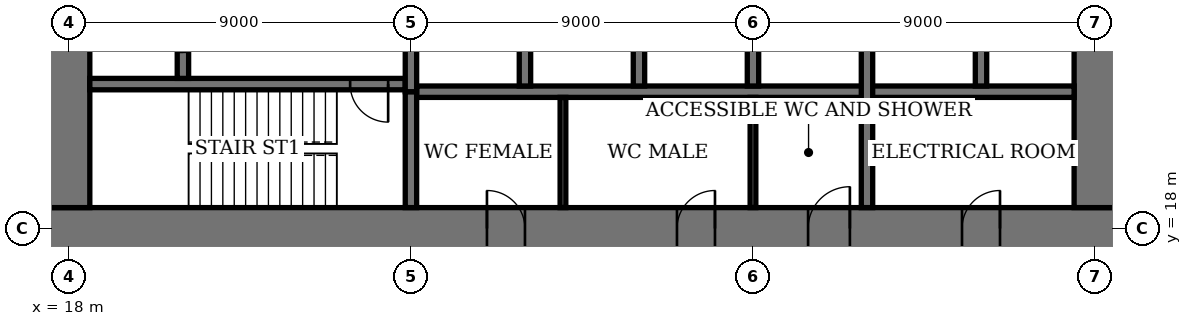
"""IFC4 building model, lengths in metres.
Left out: names, types, materials, properties, quantities, classifications, styles, units other than length and angle.
Written with IfcOpenShell. Run it as: python <this file> out.ifc"""

import sys

from ifc_helpers import new_model, si_unit, direction, frame, frame_2d, origin, place, context, subcontext, project, spatial, rectangle, extrude, element, fill, save


model = new_model("IFC4")
c1 = context("Model", 3, precision=1e-05, world=origin(), true_north=direction((0.0, 1.0)))
c2 = subcontext(c1, "Body", "Model", "MODEL_VIEW")
j1 = project(units=[si_unit("LENGTHUNIT", "METRE"), si_unit("PLANEANGLEUNIT", "RADIAN")], contexts=[c1])
p1 = place(None, origin())
s1 = spatial("IfcSite", under=j1, at=p1, CompositionType="ELEMENT")
p2 = place(p1, origin())
s2 = spatial("IfcBuilding", under=s1, at=p2, CompositionType="ELEMENT")
p3 = place(p2, frame((0.0, 0.0, 162.2)))
s3 = spatial("IfcBuildingStorey", under=s2, at=p3, CompositionType="ELEMENT", Elevation=162.2)
p4 = place(p3, frame((17.45, 18.0, 0.0), z_axis=(0.0, 0.0, 1.0), x_axis=(1.0, 0.0, 0.0)))
e1 = element("IfcWall", 1, at=p4, inside=s3, PredefinedType="SHEAR", context=c2, shape_type="SweptSolid", body=[
    extrude(rectangle(XDim=28.1, YDim=1.1, at=frame_2d((14.05, 0.0))), origin(), (0.0, 0.0, 1.0), 4.0),
])
p5 = place(p4, frame((11.55, 0.0, 0.0)))
e2 = element("IfcOpeningElement", 2, at=p5, cuts=e1, PredefinedType="OPENING", context=c2, shape_type="SweptSolid", body=[
    extrude(rectangle(XDim=1.0, YDim=2.4, at=frame_2d((0.5, 1.2))), frame((0.0, 0.56, 0.0), z_axis=(0.0, -1.0, 0.0), x_axis=(1.0, 0.0, 0.0)), (0.0, 0.0, 1.0), 1.12),
])
p6 = place(p4, frame((16.55, 0.0, 0.0)))
e3 = element("IfcOpeningElement", 3, at=p6, cuts=e1, PredefinedType="OPENING", context=c2, shape_type="SweptSolid", body=[
    extrude(rectangle(XDim=1.0, YDim=2.4, at=frame_2d((0.5, 1.2))), frame((0.0, 0.56, 0.0), z_axis=(0.0, -1.0, 0.0), x_axis=(1.0, 0.0, 0.0)), (0.0, 0.0, 1.0), 1.12),
])
p7 = place(p4, frame((20.0, 0.0, 0.0)))
e4 = element("IfcOpeningElement", 4, at=p7, cuts=e1, PredefinedType="OPENING", context=c2, shape_type="SweptSolid", body=[
    extrude(rectangle(XDim=1.1, YDim=2.4, at=frame_2d((0.55, 1.2))), frame((0.0, 0.56, 0.0), z_axis=(0.0, -1.0, 0.0), x_axis=(1.0, 0.0, 0.0)), (0.0, 0.0, 1.0), 1.12),
])
p8 = place(p4, frame((24.05, 0.0, 0.0)))
e5 = element("IfcOpeningElement", 5, at=p8, cuts=e1, PredefinedType="OPENING", context=c2, shape_type="SweptSolid", body=[
    extrude(rectangle(XDim=1.0, YDim=2.4, at=frame_2d((0.5, 1.2))), frame((0.0, 0.56, 0.0), z_axis=(0.0, -1.0, 0.0), x_axis=(1.0, 0.0, 0.0)), (0.0, 0.0, 1.0), 1.12),
])
p9 = place(p3, frame((18.0, 35.45, 0.0), z_axis=(0.0, 0.0, 1.0), x_axis=(0.0, -1.0, 0.0)))
e6 = element("IfcWall", 6, at=p9, inside=s3, PredefinedType="SHEAR", context=c2, shape_type="SweptSolid", body=[
    extrude(rectangle(XDim=16.9, YDim=1.1, at=frame_2d((8.45, 0.0))), origin(), (0.0, 0.0, 1.0), 4.0),
])
p10 = place(p9, frame((8.9, 0.0, 0.0)))
e7 = element("IfcOpeningElement", 7, at=p10, cuts=e6, PredefinedType="OPENING", context=c2, shape_type="SweptSolid", body=[
    extrude(rectangle(XDim=1.8, YDim=2.4, at=frame_2d((0.9, 1.2))), frame((0.0, 0.56, 0.0), z_axis=(0.0, -1.0, 0.0), x_axis=(1.0, 0.0, 0.0)), (0.0, 0.0, 1.0), 1.12),
])
p11 = place(p3, frame((45.0, 18.55, 0.0), z_axis=(0.0, 0.0, 1.0), x_axis=(0.0, 1.0, 0.0)))
e8 = element("IfcWall", 8, at=p11, inside=s3, PredefinedType="SHEAR", context=c2, shape_type="SweptSolid", body=[
    extrude(rectangle(XDim=16.9, YDim=1.1, at=frame_2d((8.45, 0.0))), origin(), (0.0, 0.0, 1.0), 4.0),
])
p12 = place(p11, frame((8.9, 0.0, 0.0)))
e9 = element("IfcOpeningElement", 9, at=p12, cuts=e8, PredefinedType="OPENING", context=c2, shape_type="SweptSolid", body=[
    extrude(rectangle(XDim=1.8, YDim=2.4, at=frame_2d((0.9, 1.2))), frame((0.0, 0.56, 0.0), z_axis=(0.0, -1.0, 0.0), x_axis=(1.0, 0.0, 0.0)), (0.0, 0.0, 1.0), 1.12),
])
p13 = place(p3, frame((18.55, 21.8, 0.0), z_axis=(0.0, 0.0, 1.0), x_axis=(1.0, 0.0, 0.0)))
e10 = element("IfcWall", 10, at=p13, inside=s3, PredefinedType="SHEAR", context=c2, shape_type="SweptSolid", body=[
    extrude(rectangle(XDim=8.3, YDim=0.3, at=frame_2d((4.15, 0.0))), origin(), (0.0, 0.0, 1.0), 4.0),
])
p14 = place(p13, frame((6.85, 0.0, 0.0)))
e11 = element("IfcOpeningElement", 11, at=p14, cuts=e10, PredefinedType="OPENING", context=c2, shape_type="SweptSolid", body=[
    extrude(rectangle(XDim=1.0, YDim=2.4, at=frame_2d((0.5, 1.2))), frame((0.0, 0.16, 0.0), z_axis=(0.0, -1.0, 0.0), x_axis=(1.0, 0.0, 0.0)), (0.0, 0.0, 1.0), 0.32),
])
p15 = place(p3, frame((27.0, 18.55, 0.0), z_axis=(0.0, 0.0, 1.0), x_axis=(0.0, 1.0, 0.0)))
e12 = element("IfcWall", 12, at=p15, inside=s3, PredefinedType="SHEAR", context=c2, shape_type="SweptSolid", body=[
    extrude(rectangle(XDim=3.05, YDim=0.3, at=frame_2d((1.525, 0.0))), origin(), (0.0, 0.0, 1.0), 4.0),
])
p16 = place(p3, frame((21.0, 21.95, 0.0), z_axis=(0.0, 0.0, 1.0), x_axis=(0.0, 1.0, 0.0)))
e13 = element("IfcWall", 13, at=p16, inside=s3, PredefinedType="SHEAR", context=c2, shape_type="SweptSolid", body=[
    extrude(rectangle(XDim=2.5, YDim=0.3, at=frame_2d((1.25, 0.0))), origin(), (0.0, 0.0, 1.0), 4.0),
])
p17 = place(p16, frame((0.7, 0.0, 0.0)))
e14 = element("IfcOpeningElement", 14, at=p17, cuts=e13, PredefinedType="OPENING", context=c2, shape_type="SweptSolid", body=[
    extrude(rectangle(XDim=1.1, YDim=2.4, at=frame_2d((0.55, 1.2))), frame((0.0, 0.16, 0.0), z_axis=(0.0, -1.0, 0.0), x_axis=(1.0, 0.0, 0.0)), (0.0, 0.0, 1.0), 0.32),
])
p18 = place(p3, frame((27.15, 21.6, 0.0), z_axis=(0.0, 0.0, 1.0), x_axis=(1.0, 0.0, 0.0)))
e15 = element("IfcWall", 15, at=p18, inside=s3, PredefinedType="SHEAR", context=c2, shape_type="SweptSolid", body=[
    extrude(rectangle(XDim=17.3, YDim=0.3, at=frame_2d((8.65, 0.0))), origin(), (0.0, 0.0, 1.0), 4.0),
])
for number, where, z_axis, x_axis in (
    (16, (30.0, 21.75, 0.0), (0.0, 0.0, 1.0), (0.0, 1.0, 0.0)),
    (17, (33.0, 21.75, 0.0), (0.0, 0.0, 1.0), (0.0, 1.0, 0.0)),
    (18, (36.0, 21.75, 0.0), (0.0, 0.0, 1.0), (0.0, 1.0, 0.0)),
):
    element("IfcWall", number, at=place(p3, frame(where, z_axis=z_axis, x_axis=x_axis)), inside=s3, PredefinedType="SHEAR", context=c2, shape_type="SweptSolid", body=[
        extrude(rectangle(XDim=2.7, YDim=0.3, at=frame_2d((1.35, 0.0))), origin(), (0.0, 0.0, 1.0), 4.0),
    ])
p19 = place(p3, frame((39.0, 18.55, 0.0), z_axis=(0.0, 0.0, 1.0), x_axis=(0.0, 1.0, 0.0)))
e19 = element("IfcWall", 19, at=p19, inside=s3, PredefinedType="SHEAR", context=c2, shape_type="SweptSolid", body=[
    extrude(rectangle(XDim=5.9, YDim=0.3, at=frame_2d((2.95, 0.0))), origin(), (0.0, 0.0, 1.0), 4.0),
])
p20 = place(p3, frame((42.0, 21.75, 0.0), z_axis=(0.0, 0.0, 1.0), x_axis=(0.0, 1.0, 0.0)))
e20 = element("IfcWall", 20, at=p20, inside=s3, PredefinedType="SHEAR", context=c2, shape_type="SweptSolid", body=[
    extrude(rectangle(XDim=2.7, YDim=0.3, at=frame_2d((1.35, 0.0))), origin(), (0.0, 0.0, 1.0), 4.0),
])
p21 = place(p3, frame((27.0, 21.6, 0.0), z_axis=(0.0, 0.0, 1.0), x_axis=(0.0, 1.0, 0.0)))
e21 = element("IfcWall", 21, at=p21, inside=s3, PredefinedType="SHEAR", context=c2, shape_type="SweptSolid", body=[
    extrude(rectangle(XDim=2.85, YDim=0.3, at=frame_2d((1.425, 0.0))), origin(), (0.0, 0.0, 1.0), 4.0),
])
for number, where, z_axis, x_axis in (
    (22, (31.0, 18.55, 0.0), (0.0, 0.0, 1.0), (0.0, 1.0, 0.0)),
    (23, (36.0, 18.55, 0.0), (0.0, 0.0, 1.0), (0.0, 1.0, 0.0)),
):
    element("IfcWall", number, at=place(p3, frame(where, z_axis=z_axis, x_axis=x_axis)), inside=s3, PredefinedType="PARTITIONING", context=c2, shape_type="SweptSolid", body=[
        extrude(rectangle(XDim=2.9, YDim=0.15, at=frame_2d((1.45, 0.0))), origin(), (0.0, 0.0, 1.0), 3.75),
    ])
p22 = place(p5, origin())
e24 = element("IfcDoor", 24, at=p22, inside=s3, OperationType="SINGLE_SWING_RIGHT", PredefinedType="DOOR", context=c2, shape_type="SweptSolid", body=[
    extrude(rectangle(XDim=1.0, YDim=2.4, at=frame_2d((0.5, 1.2))), frame((0.0, 0.025, 0.0), z_axis=(0.0, -1.0, 0.0), x_axis=(1.0, 0.0, 0.0)), (0.0, 0.0, 1.0), 0.05),
    extrude(rectangle(XDim=0.04, YDim=2.4, at=frame_2d((0.02, 1.2))), frame((0.0, 0.4, 0.0), z_axis=(0.0, -1.0, 0.0), x_axis=(1.0, 0.0, 0.0)), (0.0, 0.0, 1.0), 0.8),
    extrude(rectangle(XDim=0.04, YDim=2.4, at=frame_2d((0.98, 1.2))), frame((0.0, 0.4, 0.0), z_axis=(0.0, -1.0, 0.0), x_axis=(1.0, 0.0, 0.0)), (0.0, 0.0, 1.0), 0.8),
    extrude(rectangle(XDim=1.0, YDim=0.04, at=frame_2d((0.5, 2.38))), frame((0.0, 0.4, 0.0), z_axis=(0.0, -1.0, 0.0), x_axis=(1.0, 0.0, 0.0)), (0.0, 0.0, 1.0), 0.8),
])
fill(e2, e24)
p23 = place(p6, origin())
e25 = element("IfcDoor", 25, at=p23, inside=s3, OperationType="SINGLE_SWING_LEFT", PredefinedType="DOOR", context=c2, shape_type="SweptSolid", body=[
    extrude(rectangle(XDim=1.0, YDim=2.4, at=frame_2d((0.5, 1.2))), frame((0.0, 0.025, 0.0), z_axis=(0.0, -1.0, 0.0), x_axis=(1.0, 0.0, 0.0)), (0.0, 0.0, 1.0), 0.05),
    extrude(rectangle(XDim=0.04, YDim=2.4, at=frame_2d((0.02, 1.2))), frame((0.0, 0.4, 0.0), z_axis=(0.0, -1.0, 0.0), x_axis=(1.0, 0.0, 0.0)), (0.0, 0.0, 1.0), 0.8),
    extrude(rectangle(XDim=0.04, YDim=2.4, at=frame_2d((0.98, 1.2))), frame((0.0, 0.4, 0.0), z_axis=(0.0, -1.0, 0.0), x_axis=(1.0, 0.0, 0.0)), (0.0, 0.0, 1.0), 0.8),
    extrude(rectangle(XDim=1.0, YDim=0.04, at=frame_2d((0.5, 2.38))), frame((0.0, 0.4, 0.0), z_axis=(0.0, -1.0, 0.0), x_axis=(1.0, 0.0, 0.0)), (0.0, 0.0, 1.0), 0.8),
])
fill(e3, e25)
p24 = place(p7, origin())
e26 = element("IfcDoor", 26, at=p24, inside=s3, OperationType="SINGLE_SWING_LEFT", PredefinedType="DOOR", context=c2, shape_type="SweptSolid", body=[
    extrude(rectangle(XDim=1.1, YDim=2.4, at=frame_2d((0.55, 1.2))), frame((0.0, 0.025, 0.0), z_axis=(0.0, -1.0, 0.0), x_axis=(1.0, 0.0, 0.0)), (0.0, 0.0, 1.0), 0.05),
    extrude(rectangle(XDim=0.04, YDim=2.4, at=frame_2d((0.02, 1.2))), frame((0.0, 0.44, 0.0), z_axis=(0.0, -1.0, 0.0), x_axis=(1.0, 0.0, 0.0)), (0.0, 0.0, 1.0), 0.88),
    extrude(rectangle(XDim=0.04, YDim=2.4, at=frame_2d((1.08, 1.2))), frame((0.0, 0.44, 0.0), z_axis=(0.0, -1.0, 0.0), x_axis=(1.0, 0.0, 0.0)), (0.0, 0.0, 1.0), 0.88),
    extrude(rectangle(XDim=1.1, YDim=0.04, at=frame_2d((0.55, 2.38))), frame((0.0, 0.44, 0.0), z_axis=(0.0, -1.0, 0.0), x_axis=(1.0, 0.0, 0.0)), (0.0, 0.0, 1.0), 0.88),
])
fill(e4, e26)
p25 = place(p8, origin())
e27 = element("IfcDoor", 27, at=p25, inside=s3, OperationType="SINGLE_SWING_LEFT", PredefinedType="DOOR", context=c2, shape_type="SweptSolid", body=[
    extrude(rectangle(XDim=1.0, YDim=2.4, at=frame_2d((0.5, 1.2))), frame((0.0, 0.025, 0.0), z_axis=(0.0, -1.0, 0.0), x_axis=(1.0, 0.0, 0.0)), (0.0, 0.0, 1.0), 0.05),
    extrude(rectangle(XDim=0.04, YDim=2.4, at=frame_2d((0.02, 1.2))), frame((0.0, 0.4, 0.0), z_axis=(0.0, -1.0, 0.0), x_axis=(1.0, 0.0, 0.0)), (0.0, 0.0, 1.0), 0.8),
    extrude(rectangle(XDim=0.04, YDim=2.4, at=frame_2d((0.98, 1.2))), frame((0.0, 0.4, 0.0), z_axis=(0.0, -1.0, 0.0), x_axis=(1.0, 0.0, 0.0)), (0.0, 0.0, 1.0), 0.8),
    extrude(rectangle(XDim=1.0, YDim=0.04, at=frame_2d((0.5, 2.38))), frame((0.0, 0.4, 0.0), z_axis=(0.0, -1.0, 0.0), x_axis=(1.0, 0.0, 0.0)), (0.0, 0.0, 1.0), 0.8),
])
fill(e5, e27)
p26 = place(p14, origin())
e28 = element("IfcDoor", 28, at=p26, inside=s3, OperationType="SINGLE_SWING_RIGHT", PredefinedType="DOOR", context=c2, shape_type="SweptSolid", body=[
    extrude(rectangle(XDim=1.0, YDim=2.4, at=frame_2d((0.5, 1.2))), frame((0.0, 0.03, 0.0), z_axis=(0.0, -1.0, 0.0), x_axis=(1.0, 0.0, 0.0)), (0.0, 0.0, 1.0), 0.06),
])
fill(e11, e28)
save(model, sys.argv[1])
